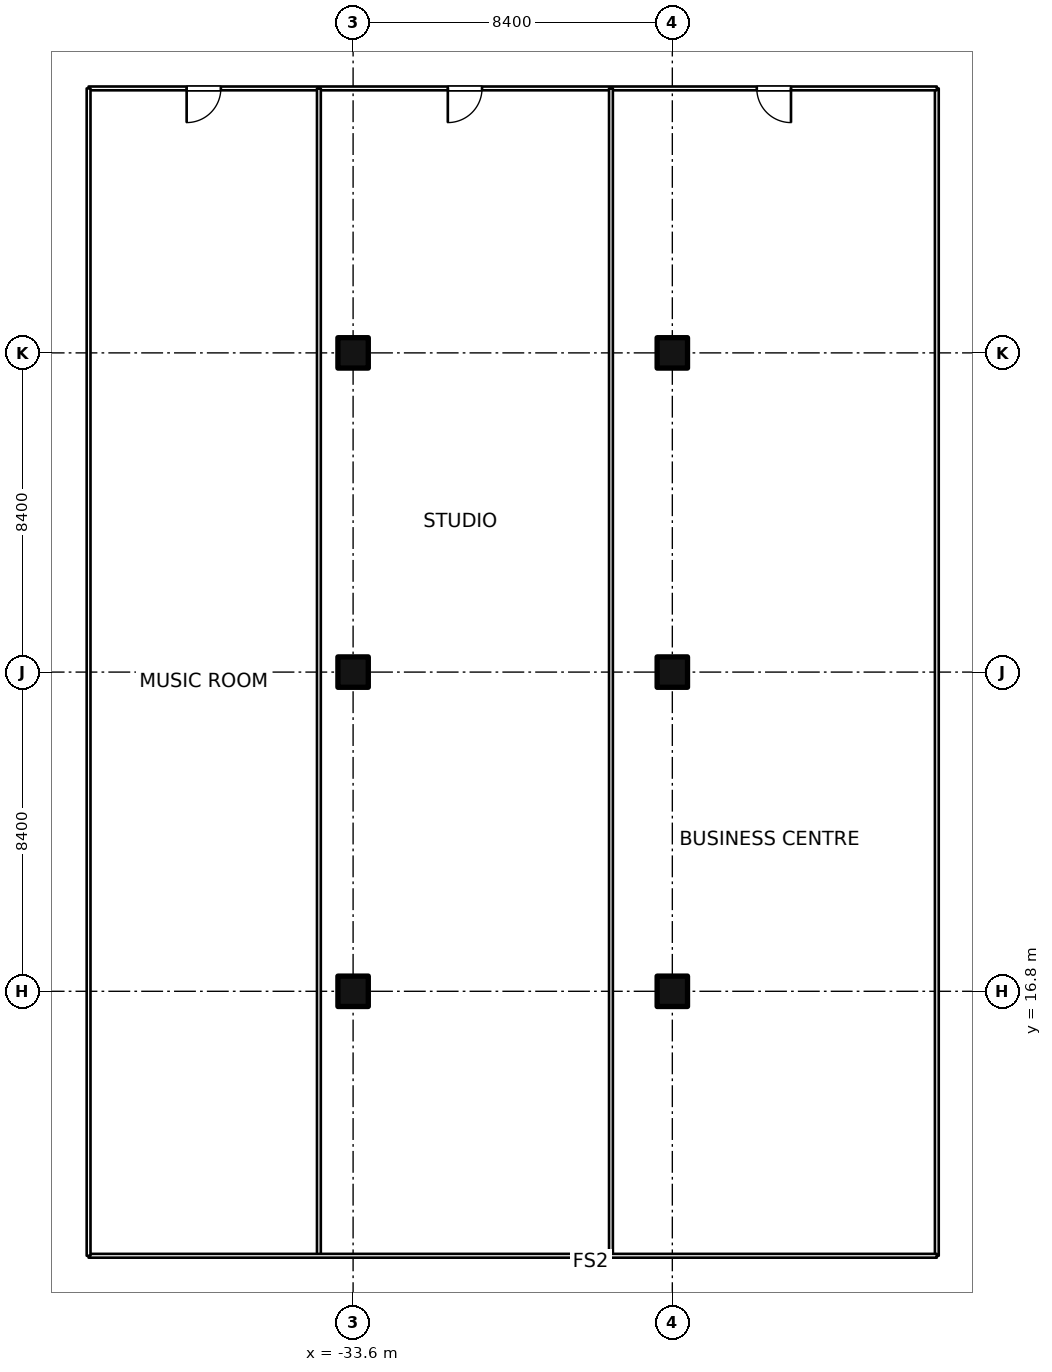
"""IFC4 building model, lengths in metres.
Left out: names, types, materials, properties, quantities, classifications, styles, units other than length and angle.
Written with IfcOpenShell. Run it as: python <this file> out.ifc"""

import sys

from ifc_helpers import new_model, si_unit, direction, frame, frame_2d, origin, origin_2d, place, context, subcontext, project, spatial, rectangle, extrude, element, fill, save


model = new_model("IFC4")
c1 = context("Model", 3, precision=1e-05, world=origin(), true_north=direction((0.0, 1.0)))
c2 = subcontext(c1, "Body", "Model", "MODEL_VIEW")
j1 = project(units=[si_unit("LENGTHUNIT", "METRE"), si_unit("PLANEANGLEUNIT", "RADIAN")], contexts=[c1])
p1 = place(None, origin())
s1 = spatial("IfcSite", under=j1, at=p1, CompositionType="ELEMENT")
p2 = place(p1, origin())
s2 = spatial("IfcBuilding", under=s1, at=p2, CompositionType="ELEMENT")
p3 = place(p2, frame((0.0, 0.0, 16.0)))
s3 = spatial("IfcBuildingStorey", under=s2, at=p3, CompositionType="ELEMENT", Elevation=16.0)
for number, where, z_axis, x_axis in (
    (1, (-33.6, 16.8, 0.0), (0.0, 0.0, 1.0), (1.0, 0.0, 0.0)),
    (2, (-33.6, 25.2, 0.0), (0.0, 0.0, 1.0), (1.0, 0.0, 0.0)),
    (3, (-33.6, 33.6, 0.0), (0.0, 0.0, 1.0), (1.0, 0.0, 0.0)),
    (4, (-25.2, 16.8, 0.0), (0.0, 0.0, 1.0), (1.0, 0.0, 0.0)),
    (5, (-25.2, 25.2, 0.0), (0.0, 0.0, 1.0), (1.0, 0.0, 0.0)),
    (6, (-25.2, 33.6, 0.0), (0.0, 0.0, 1.0), (1.0, 0.0, 0.0)),
):
    element("IfcColumn", number, at=place(p3, frame(where, z_axis=z_axis, x_axis=x_axis)), inside=s3, PredefinedType="COLUMN", context=c2, shape_type="SweptSolid", body=[
        extrude(rectangle(XDim=0.8, YDim=0.8, at=origin_2d()), origin(), (0.0, 0.0, 1.0), 5.0),
    ])
p4 = place(p3, frame((-40.56, 9.84, 0.0), z_axis=(0.0, 0.0, 1.0), x_axis=(1.0, 0.0, 0.0)))
e7 = element("IfcWall", 7, at=p4, inside=s3, PredefinedType="PARTITIONING", context=c2, shape_type="SweptSolid", body=[
    extrude(rectangle(XDim=22.32, YDim=0.1, at=frame_2d((11.16, 0.0))), origin(), (0.0, 0.0, 1.0), 4.7),
])
p5 = place(p3, frame((-18.24, 9.84, 0.0), z_axis=(0.0, 0.0, 1.0), x_axis=(0.0, 1.0, 0.0)))
e8 = element("IfcWall", 8, at=p5, inside=s3, PredefinedType="PARTITIONING", context=c2, shape_type="SweptSolid", body=[
    extrude(rectangle(XDim=30.72, YDim=0.1, at=frame_2d((15.36, 0.0))), origin(), (0.0, 0.0, 1.0), 4.7),
])
p6 = place(p3, frame((-18.24, 40.56, 0.0), z_axis=(0.0, 0.0, 1.0), x_axis=(-1.0, 0.0, 0.0)))
e9 = element("IfcWall", 9, at=p6, inside=s3, PredefinedType="PARTITIONING", context=c2, shape_type="SweptSolid", body=[
    extrude(rectangle(XDim=22.32, YDim=0.1, at=frame_2d((11.16, 0.0))), origin(), (0.0, 0.0, 1.0), 4.7),
])
p7 = place(p6, frame((18.84, 0.0, 0.0)))
e10 = element("IfcOpeningElement", 10, at=p7, cuts=e9, PredefinedType="OPENING", context=c2, shape_type="SweptSolid", body=[
    extrude(rectangle(XDim=0.9, YDim=2.1, at=frame_2d((0.45, 1.05))), frame((0.0, 0.06, 0.0), z_axis=(0.0, -1.0, 0.0), x_axis=(1.0, 0.0, 0.0)), (0.0, 0.0, 1.0), 0.12),
])
p8 = place(p6, frame((11.968, 0.0, 0.0)))
e11 = element("IfcOpeningElement", 11, at=p8, cuts=e9, PredefinedType="OPENING", context=c2, shape_type="SweptSolid", body=[
    extrude(rectangle(XDim=0.9, YDim=2.1, at=frame_2d((0.45, 1.05))), frame((0.0, 0.06, 0.0), z_axis=(0.0, -1.0, 0.0), x_axis=(1.0, 0.0, 0.0)), (0.0, 0.0, 1.0), 0.12),
])
p9 = place(p6, frame((3.837, 0.0, 0.0)))
e12 = element("IfcOpeningElement", 12, at=p9, cuts=e9, PredefinedType="OPENING", context=c2, shape_type="SweptSolid", body=[
    extrude(rectangle(XDim=0.9, YDim=2.1, at=frame_2d((0.45, 1.05))), frame((0.0, 0.06, 0.0), z_axis=(0.0, -1.0, 0.0), x_axis=(1.0, 0.0, 0.0)), (0.0, 0.0, 1.0), 0.12),
])
for number, where, z_axis, x_axis in (
    (13, (-40.56, 40.56, 0.0), (0.0, 0.0, 1.0), (0.0, -1.0, 0.0)),
    (14, (-34.5, 9.84, 0.0), (0.0, 0.0, 1.0), (0.0, 1.0, 0.0)),
    (15, (-26.815, 9.84, 0.0), (0.0, 0.0, 1.0), (0.0, 1.0, 0.0)),
):
    element("IfcWall", number, at=place(p3, frame(where, z_axis=z_axis, x_axis=x_axis)), inside=s3, PredefinedType="PARTITIONING", context=c2, shape_type="SweptSolid", body=[
        extrude(rectangle(XDim=30.72, YDim=0.1, at=frame_2d((15.36, 0.0))), origin(), (0.0, 0.0, 1.0), 4.7),
    ])
p10 = place(p7, origin())
e16 = element("IfcDoor", 16, at=p10, inside=s3, OperationType="SINGLE_SWING_RIGHT", PredefinedType="DOOR", context=c2, shape_type="SweptSolid", body=[
    extrude(rectangle(XDim=0.9, YDim=2.1, at=frame_2d((0.45, 1.05))), frame((0.0, 0.025, 0.0), z_axis=(0.0, -1.0, 0.0), x_axis=(1.0, 0.0, 0.0)), (0.0, 0.0, 1.0), 0.05),
])
fill(e10, e16)
p11 = place(p8, origin())
e17 = element("IfcDoor", 17, at=p11, inside=s3, OperationType="SINGLE_SWING_RIGHT", PredefinedType="DOOR", context=c2, shape_type="SweptSolid", body=[
    extrude(rectangle(XDim=0.9, YDim=2.1, at=frame_2d((0.45, 1.05))), frame((0.0, 0.025, 0.0), z_axis=(0.0, -1.0, 0.0), x_axis=(1.0, 0.0, 0.0)), (0.0, 0.0, 1.0), 0.05),
])
fill(e11, e17)
p12 = place(p9, origin())
e18 = element("IfcDoor", 18, at=p12, inside=s3, OperationType="SINGLE_SWING_LEFT", PredefinedType="DOOR", context=c2, shape_type="SweptSolid", body=[
    extrude(rectangle(XDim=0.9, YDim=2.1, at=frame_2d((0.45, 1.05))), frame((0.0, 0.025, 0.0), z_axis=(0.0, -1.0, 0.0), x_axis=(1.0, 0.0, 0.0)), (0.0, 0.0, 1.0), 0.05),
])
fill(e12, e18)
save(model, sys.argv[1])
